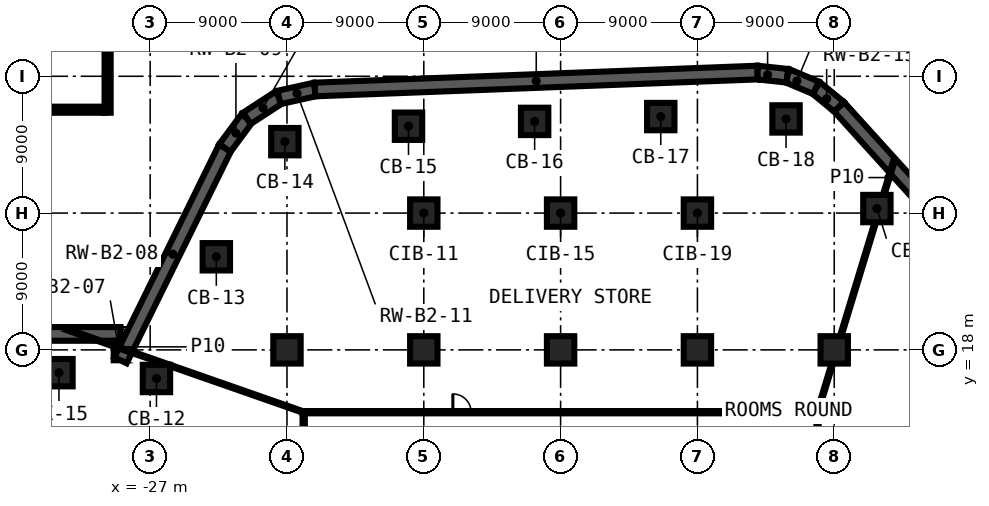
"""IFC4 building model, lengths in metres.
Left out: names, types, materials, properties, quantities, classifications, styles, units other than length and angle.
Written with IfcOpenShell. Run it as: python <this file> out.ifc"""

import sys

from ifc_helpers import new_model, si_unit, direction, frame, frame_2d, origin, origin_2d, place, context, subcontext, project, spatial, polyline, rectangle, outline, extrude, element, fill, save


model = new_model("IFC4")
c1 = context("Model", 3, precision=1e-05, world=origin(), true_north=direction((0.0, 1.0)))
c2 = subcontext(c1, "Body", "Model", "MODEL_VIEW")
j1 = project(units=[si_unit("LENGTHUNIT", "METRE"), si_unit("PLANEANGLEUNIT", "RADIAN")], contexts=[c1])
p1 = place(None, origin())
s1 = spatial("IfcSite", under=j1, at=p1, CompositionType="ELEMENT")
p2 = place(p1, origin())
s2 = spatial("IfcBuilding", under=s1, at=p2, CompositionType="ELEMENT")
p3 = place(p2, frame((0.0, 0.0, -11.5)))
s3 = spatial("IfcBuildingStorey", under=s2, at=p3, CompositionType="ELEMENT", Elevation=-11.5)
for number, where, z_axis, x_axis in (
    (1, (-26.586, 16.118, 0.0), (0.0, 0.0, 1.0), (1.0, 0.0, 0.0)),
    (2, (-22.648, 24.125, 0.0), (0.0, 0.0, 1.0), (1.0, 0.0, 0.0)),
    (3, (-18.139, 31.699, 0.0), (0.0, 0.0, 1.0), (1.0, 0.0, 0.0)),
    (4, (-10.006, 32.714, 0.0), (0.0, 0.0, 1.0), (1.0, 0.0, 0.0)),
    (5, (-1.708, 33.032, 0.0), (0.0, 0.0, 1.0), (1.0, 0.0, 0.0)),
    (6, (6.589, 33.349, 0.0), (0.0, 0.0, 1.0), (1.0, 0.0, 0.0)),
    (7, (14.83, 33.194, 0.0), (0.0, 0.0, 1.0), (1.0, 0.0, 0.0)),
    (8, (20.805, 27.297, 0.0), (0.0, 0.0, 1.0), (1.0, 0.0, 0.0)),
    (9, (-18.0, 18.0, 0.0), (0.0, 0.0, 1.0), (1.0, 0.0, 0.0)),
    (10, (-9.0, 18.0, 0.0), (0.0, 0.0, 1.0), (1.0, 0.0, 0.0)),
    (11, (-9.0, 27.0, 0.0), (0.0, 0.0, 1.0), (1.0, 0.0, 0.0)),
    (12, (0.0, 18.0, 0.0), (0.0, 0.0, 1.0), (1.0, 0.0, 0.0)),
    (13, (0.0, 27.0, 0.0), (0.0, 0.0, 1.0), (1.0, 0.0, 0.0)),
    (14, (9.0, 18.0, 0.0), (0.0, 0.0, 1.0), (1.0, 0.0, 0.0)),
    (15, (9.0, 27.0, 0.0), (0.0, 0.0, 1.0), (1.0, 0.0, 0.0)),
    (16, (18.0, 18.0, 0.0), (0.0, 0.0, 1.0), (1.0, 0.0, 0.0)),
    (17, (-33.0, 16.5, 0.0), (0.0, 0.0, 1.0), (1.0, 0.0, 0.0)),
):
    element("IfcColumn", number, at=place(p3, frame(where, z_axis=z_axis, x_axis=x_axis)), inside=s3, PredefinedType="COLUMN", context=c2, shape_type="SweptSolid", body=[
        extrude(rectangle(XDim=1.8, YDim=1.8, at=origin_2d()), origin(), (0.0, 0.0, 1.0), 5.1),
    ])
p4 = place(p3, frame((-59.05, 19.05, 0.0), z_axis=(0.0, 0.0, 1.0), x_axis=(1.0, 0.0, 0.0)))
e18 = element("IfcWall", 18, at=p4, inside=s3, PredefinedType="SHEAR", context=c2, shape_type="SweptSolid", body=[
    extrude(rectangle(XDim=30.1, YDim=0.9, at=frame_2d((15.05, 0.0))), origin(), (0.0, 0.0, 1.0), 5.1),
])
p5 = place(p3, origin())
e19 = element("IfcWall", 19, at=p5, inside=s3, PredefinedType="SHEAR", context=c2, shape_type="SweptSolid", body=[
    extrude(outline(polyline([(-29.4, 17.317), (-28.95, 17.317), (-29.354, 17.515), (-28.599, 19.05), (-28.95, 19.05), (-28.95, 18.6), (-29.4, 18.6), (-29.4, 17.317)])), origin(), (0.0, 0.0, 1.0), 5.1),
])
p6 = place(p3, frame((-28.95, 17.317, 0.0), z_axis=(0.0, 0.0, 1.0), x_axis=(0.441350917098, 0.897334590873, 0.0)))
e20 = element("IfcWall", 20, at=p6, inside=s3, PredefinedType="SHEAR", context=c2, shape_type="SweptSolid", body=[
    extrude(rectangle(XDim=15.567, YDim=0.9, at=frame_2d((7.783, 0.0))), origin(), (0.0, 0.0, 1.0), 5.1),
])
p7 = place(p3, frame((-22.08, 31.285, 0.0), z_axis=(0.0, 0.0, 1.0), x_axis=(0.594215473741, 0.804305893779, 0.0)))
e21 = element("IfcWall", 21, at=p7, inside=s3, PredefinedType="SHEAR", context=c2, shape_type="SweptSolid", body=[
    extrude(rectangle(XDim=2.424, YDim=0.9, at=frame_2d((1.212, 0.0))), origin(), (0.0, 0.0, 1.0), 5.1),
])
p8 = place(p3, frame((-20.639, 33.235, 0.0), z_axis=(0.0, 0.0, 1.0), x_axis=(0.838638354795, 0.544688635705, 0.0)))
e22 = element("IfcWall", 22, at=p8, inside=s3, PredefinedType="SHEAR", context=c2, shape_type="SweptSolid", body=[
    extrude(rectangle(XDim=2.52, YDim=0.9, at=frame_2d((1.26, 0.0))), origin(), (0.0, 0.0, 1.0), 5.1),
])
p9 = place(p3, frame((-18.526, 34.608, 0.0), z_axis=(0.0, 0.0, 1.0), x_axis=(0.976451748541, 0.215735909786, 0.0)))
e23 = element("IfcWall", 23, at=p9, inside=s3, PredefinedType="SHEAR", context=c2, shape_type="SweptSolid", body=[
    extrude(rectangle(XDim=2.424, YDim=0.9, at=frame_2d((1.212, 0.0))), origin(), (0.0, 0.0, 1.0), 5.1),
])
p10 = place(p3, frame((-16.159, 35.131, 0.0), z_axis=(0.0, 0.0, 1.0), x_axis=(0.999269062673, 0.038227482067, 0.0)))
e24 = element("IfcWall", 24, at=p10, inside=s3, PredefinedType="SHEAR", context=c2, shape_type="SweptSolid", body=[
    extrude(rectangle(XDim=29.135, YDim=0.9, at=frame_2d((14.568, 0.0))), origin(), (0.0, 0.0, 1.0), 5.1),
])
p11 = place(p3, origin())
e25 = element("IfcWall", 25, at=p11, inside=s3, PredefinedType="SHEAR", context=c2, shape_type="SweptSolid", body=[
    extrude(outline(polyline([(14.962, 36.481), (13.003, 36.692), (12.955, 36.244), (12.972, 35.795), (12.94, 35.794), (14.866, 35.586), (14.962, 36.481)])), origin(), (0.0, 0.0, 1.0), 5.1),
])
p12 = place(p3, origin())
e26 = element("IfcWall", 26, at=p12, inside=s3, PredefinedType="SHEAR", context=c2, shape_type="SweptSolid", body=[
    extrude(outline(polyline([(16.976, 35.654), (15.089, 36.448), (14.914, 36.033), (14.866, 35.586), (14.801, 35.593), (16.627, 34.824), (16.976, 35.654)])), origin(), (0.0, 0.0, 1.0), 5.1),
])
p13 = place(p3, origin())
e27 = element("IfcWall", 27, at=p13, inside=s3, PredefinedType="SHEAR", context=c2, shape_type="SweptSolid", body=[
    extrude(outline(polyline([(18.609, 34.333), (17.088, 35.586), (16.802, 35.239), (16.627, 34.824), (16.567, 34.85), (18.011, 33.659), (17.989, 33.684), (18.323, 33.986), (18.609, 34.333)])), origin(), (0.0, 0.0, 1.0), 5.1),
])
p14 = place(p3, frame((18.323, 33.986, 0.0), z_axis=(0.0, 0.0, 1.0), x_axis=(0.671255569768, -0.741225984471, 0.0)))
e28 = element("IfcWall", 28, at=p14, inside=s3, PredefinedType="SHEAR", context=c2, shape_type="SweptSolid", body=[
    extrude(rectangle(XDim=20.15, YDim=0.9, at=frame_2d((10.075, 0.0))), origin(), (0.0, 0.0, 1.0), 5.1),
])
p15 = place(p3, frame((-16.975, 13.9, 0.0), z_axis=(0.0, 0.0, 1.0), x_axis=(1.0, 0.0, 0.0)))
e29 = element("IfcWall", 29, at=p15, inside=s3, PredefinedType="PARTITIONING", context=c2, shape_type="SweptSolid", body=[
    extrude(rectangle(XDim=33.95, YDim=0.15, at=frame_2d((16.975, 0.0))), origin(), (0.0, 0.0, 1.0), 5.1),
])
p16 = place(p15, frame((9.887, 0.0, 0.0)))
e30 = element("IfcOpeningElement", 30, at=p16, cuts=e29, PredefinedType="OPENING", context=c2, shape_type="SweptSolid", body=[
    extrude(rectangle(XDim=1.2, YDim=2.1, at=frame_2d((0.6, 1.05))), frame((0.0, 0.085, 0.0), z_axis=(0.0, -1.0, 0.0), x_axis=(1.0, 0.0, 0.0)), (0.0, 0.0, 1.0), 0.17),
])
p17 = place(p3, frame((16.9, 13.9, 0.0), z_axis=(0.0, 0.0, 1.0), x_axis=(0.291202273884, 0.95666150528, 0.0)))
e31 = element("IfcWall", 31, at=p17, inside=s3, PredefinedType="PARTITIONING", context=c2, shape_type="SweptSolid", body=[
    extrude(rectangle(XDim=3.345, YDim=0.1, at=frame_2d((1.673, 0.0))), origin(), (0.0, 0.0, 1.0), 5.1),
])
p18 = place(p3, frame((18.422, 18.9, 0.0), z_axis=(0.0, 0.0, 1.0), x_axis=(0.291192607523, 0.956664447611, 0.0)))
e32 = element("IfcWall", 32, at=p18, inside=s3, PredefinedType="PARTITIONING", context=c2, shape_type="SweptSolid", body=[
    extrude(rectangle(XDim=7.837, YDim=0.1, at=frame_2d((3.918, 0.0))), origin(), (0.0, 0.0, 1.0), 5.1),
])
p19 = place(p3, frame((21.252, 28.197, 0.0), z_axis=(0.0, 0.0, 1.0), x_axis=(0.291210561393, 0.956658982571, 0.0)))
e33 = element("IfcWall", 33, at=p19, inside=s3, PredefinedType="PARTITIONING", context=c2, shape_type="SweptSolid", body=[
    extrude(rectangle(XDim=2.382, YDim=0.1, at=frame_2d((1.191, 0.0))), origin(), (0.0, 0.0, 1.0), 5.1),
])
p20 = place(p3, frame((16.9, 13.825, 0.0), z_axis=(0.0, 0.0, 1.0), x_axis=(0.0, -1.0, 0.0)))
e34 = element("IfcWall", 34, at=p20, inside=s3, PredefinedType="PARTITIONING", context=c2, shape_type="SweptSolid", body=[
    extrude(rectangle(XDim=27.65, YDim=0.15, at=frame_2d((13.825, 0.0))), origin(), (0.0, 0.0, 1.0), 5.1),
])
p21 = place(p20, frame((18.445, 0.0, 0.0)))
e35 = element("IfcOpeningElement", 35, at=p21, cuts=e34, PredefinedType="OPENING", context=c2, shape_type="SweptSolid", body=[
    extrude(rectangle(XDim=1.2, YDim=2.1, at=frame_2d((0.6, 1.05))), frame((0.0, 0.085, 0.0), z_axis=(0.0, -1.0, 0.0), x_axis=(1.0, 0.0, 0.0)), (0.0, 0.0, 1.0), 0.17),
])
p22 = place(p3, frame((-16.9, -13.825, 0.0), z_axis=(0.0, 0.0, 1.0), x_axis=(0.0, 1.0, 0.0)))
e36 = element("IfcWall", 36, at=p22, inside=s3, PredefinedType="PARTITIONING", context=c2, shape_type="SweptSolid", body=[
    extrude(rectangle(XDim=27.65, YDim=0.15, at=frame_2d((13.825, 0.0))), origin(), (0.0, 0.0, 1.0), 5.1),
])
p23 = place(p22, frame((18.445, 0.0, 0.0)))
e37 = element("IfcOpeningElement", 37, at=p23, cuts=e36, PredefinedType="OPENING", context=c2, shape_type="SweptSolid", body=[
    extrude(rectangle(XDim=1.2, YDim=2.1, at=frame_2d((0.6, 1.05))), frame((0.0, 0.085, 0.0), z_axis=(0.0, -1.0, 0.0), x_axis=(1.0, 0.0, 0.0)), (0.0, 0.0, 1.0), 0.17),
])
p24 = place(p3, frame((-32.585, 19.38, 0.0), z_axis=(0.0, 0.0, 1.0), x_axis=(0.944040530472, -0.329829466279, 0.0)))
e38 = element("IfcWall", 38, at=p24, inside=s3, PredefinedType="PARTITIONING", context=c2, shape_type="SweptSolid", body=[
    extrude(rectangle(XDim=7.161, YDim=0.1, at=frame_2d((3.58, 0.0))), origin(), (0.0, 0.0, 1.0), 5.1),
])
p25 = place(p3, frame((-25.686, 16.969, 0.0), z_axis=(0.0, 0.0, 1.0), x_axis=(0.944025503462, -0.329872473561, 0.0)))
e39 = element("IfcWall", 39, at=p25, inside=s3, PredefinedType="PARTITIONING", context=c2, shape_type="SweptSolid", body=[
    extrude(rectangle(XDim=9.307, YDim=0.1, at=frame_2d((4.653, 0.0))), origin(), (0.0, 0.0, 1.0), 5.1),
])
p26 = place(p3, frame((-62.1, 33.8, 0.0), z_axis=(0.0, 0.0, 1.0), x_axis=(1.0, 0.0, 0.0)))
e40 = element("IfcWall", 40, at=p26, inside=s3, PredefinedType="SOLIDWALL", context=c2, shape_type="SweptSolid", body=[
    extrude(rectangle(XDim=32.1, YDim=0.4, at=frame_2d((16.05, 0.0))), origin(), (0.0, 0.0, 1.0), 5.5),
])
p27 = place(p3, frame((-29.8, 33.6, 0.0), z_axis=(0.0, 0.0, 1.0), x_axis=(0.0, 1.0, 0.0)))
e41 = element("IfcWall", 41, at=p27, inside=s3, PredefinedType="SOLIDWALL", context=c2, shape_type="SweptSolid", body=[
    extrude(rectangle(XDim=20.4, YDim=0.4, at=frame_2d((10.2, 0.0))), origin(), (0.0, 0.0, 1.0), 5.5),
])
p28 = place(p16, origin())
e42 = element("IfcDoor", 42, at=p28, inside=s3, OperationType="SINGLE_SWING_RIGHT", PredefinedType="DOOR", context=c2, shape_type="SweptSolid", body=[
    extrude(rectangle(XDim=1.2, YDim=2.1, at=frame_2d((0.6, 1.05))), frame((0.0, 0.025, 0.0), z_axis=(0.0, -1.0, 0.0), x_axis=(1.0, 0.0, 0.0)), (0.0, 0.0, 1.0), 0.05),
])
fill(e30, e42)
save(model, sys.argv[1])
